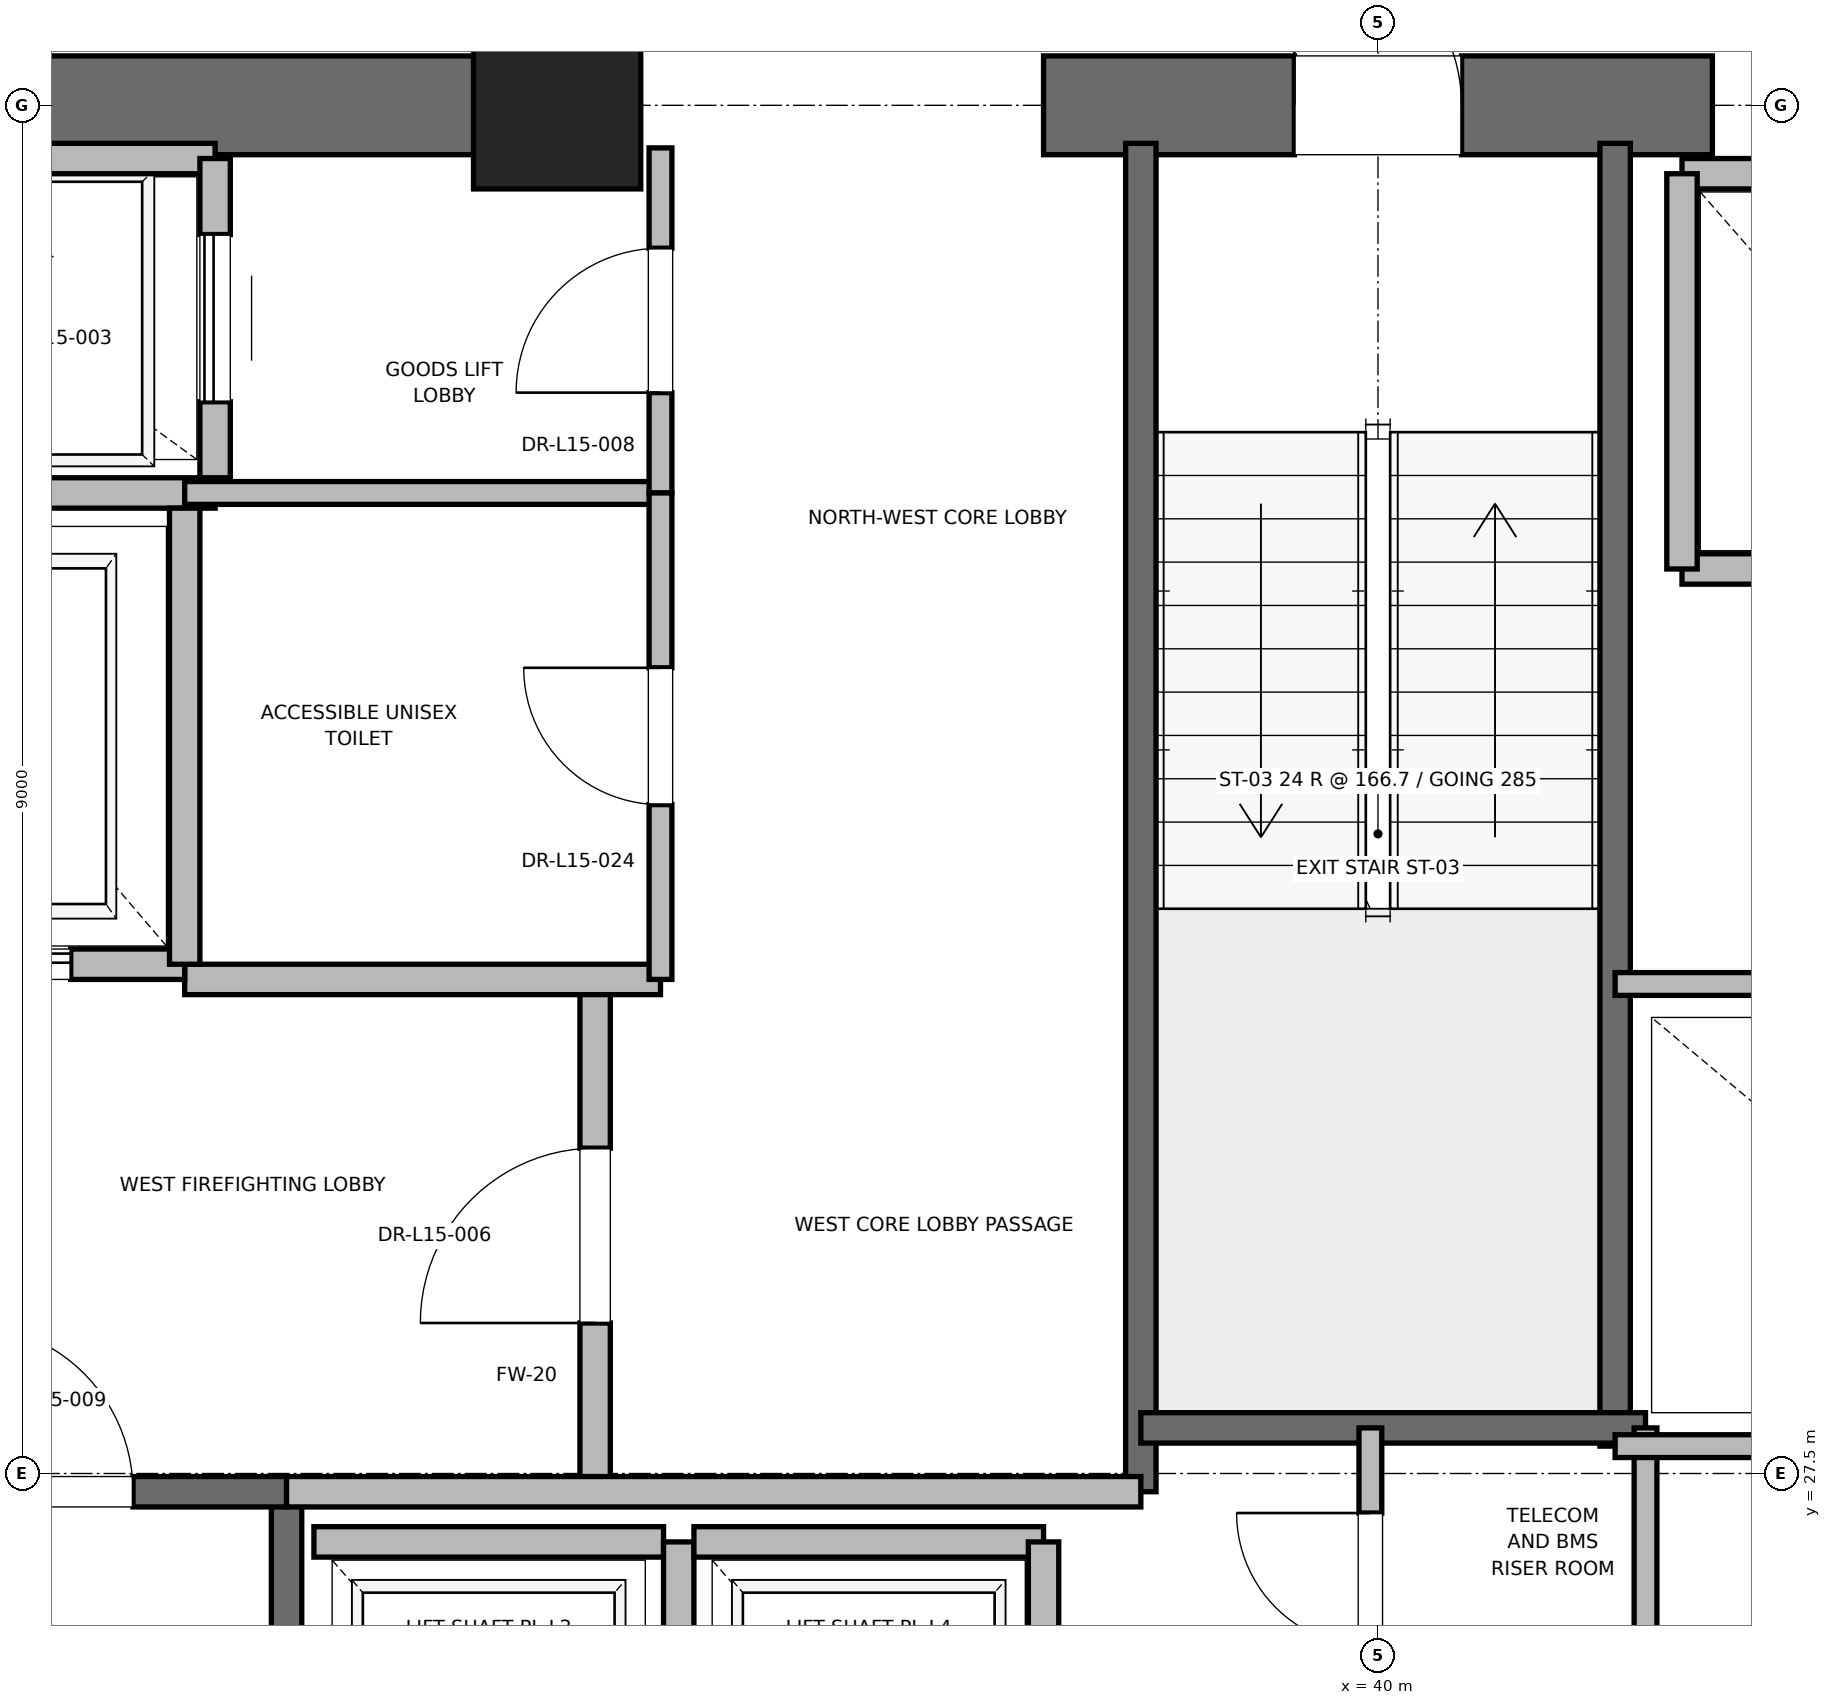
"""IFC4 building model, lengths in metres.
Left out: names, types, materials, properties, quantities, classifications, styles, units other than length and angle.
Written with IfcOpenShell. Run it as: python <this file> out.ifc"""

import sys

from ifc_helpers import new_model, si_unit, direction, frame, frame_2d, origin, origin_2d, place, context, subcontext, project, spatial, rectangle, extrude, element, fill, save


model = new_model("IFC4")
c1 = context("Model", 3, precision=1e-05, world=origin(), true_north=direction((0.0, 1.0)))
c2 = subcontext(c1, "Body", "Model", "MODEL_VIEW")
j1 = project(units=[si_unit("LENGTHUNIT", "METRE"), si_unit("PLANEANGLEUNIT", "RADIAN")], contexts=[c1])
p1 = place(None, origin())
s1 = spatial("IfcSite", under=j1, at=p1, CompositionType="ELEMENT")
p2 = place(p1, origin())
s2 = spatial("IfcBuilding", under=s1, at=p2, CompositionType="ELEMENT")
p3 = place(p2, frame((0.0, 0.0, 67.6)))
s3 = spatial("IfcBuildingStorey", under=s2, at=p3, CompositionType="ELEMENT", Elevation=67.6)
p4 = place(p3, frame((34.6, 36.5, 0.0), z_axis=(0.0, 0.0, 1.0), x_axis=(1.0, 0.0, 0.0)))
e1 = element("IfcColumn", 1, at=p4, inside=s3, PredefinedType="PILASTER", context=c2, shape_type="SweptSolid", body=[
    extrude(rectangle(XDim=1.1, YDim=1.1, at=origin_2d()), origin(), (0.0, 0.0, 1.0), 4.0),
])
p5 = place(p3, frame((29.0, 36.5, 0.0), z_axis=(0.0, 0.0, 1.0), x_axis=(1.0, 0.0, 0.0)))
e2 = element("IfcWall", 2, at=p5, inside=s3, PredefinedType="SHEAR", context=c2, shape_type="SweptSolid", body=[
    extrude(rectangle(XDim=5.8, YDim=0.65, at=frame_2d((2.9, 0.0))), origin(), (0.0, 0.0, 1.0), 3.76),
])
p6 = place(p3, frame((37.8, 36.5, 0.0), z_axis=(0.0, 0.0, 1.0), x_axis=(1.0, 0.0, 0.0)))
e3 = element("IfcWall", 3, at=p6, inside=s3, PredefinedType="SHEAR", context=c2, shape_type="SweptSolid", body=[
    extrude(rectangle(XDim=4.4, YDim=0.65, at=frame_2d((2.2, 0.0))), origin(), (0.0, 0.0, 1.0), 3.76),
])
p7 = place(p6, frame((1.65, 0.0, 0.0)))
e4 = element("IfcOpeningElement", 4, at=p7, cuts=e3, PredefinedType="OPENING", context=c2, shape_type="SweptSolid", body=[
    extrude(rectangle(XDim=1.1, YDim=2.15, at=frame_2d((0.55, 1.075))), frame((0.0, 0.325, 0.0), z_axis=(0.0, -1.0, 0.0), x_axis=(1.0, 0.0, 0.0)), (0.0, 0.0, 1.0), 0.65),
])
p8 = place(p3, frame((32.82, 18.6, 0.0), z_axis=(0.0, 0.0, 1.0), x_axis=(0.0, 1.0, 0.0)))
e5 = element("IfcWall", 5, at=p8, inside=s3, PredefinedType="SOLIDWALL", context=c2, shape_type="SweptSolid", body=[
    extrude(rectangle(XDim=8.78, YDim=0.2, at=frame_2d((4.39, 0.0))), origin(), (0.0, 0.0, 1.0), 3.76),
])
p9 = place(p3, frame((29.7, 27.38, 0.0), z_axis=(0.0, 0.0, 1.0), x_axis=(1.0, 0.0, 0.0)))
e6 = element("IfcWall", 6, at=p9, inside=s3, PredefinedType="SOLIDWALL", context=c2, shape_type="SweptSolid", body=[
    extrude(rectangle(XDim=3.12, YDim=0.2, at=frame_2d((1.56, 0.0))), origin(), (0.0, 0.0, 1.0), 3.76),
])
p10 = place(p9, frame((1.01, 0.0, 0.0)))
e7 = element("IfcOpeningElement", 7, at=p10, cuts=e6, PredefinedType="OPENING", context=c2, shape_type="SweptSolid", body=[
    extrude(rectangle(XDim=1.1, YDim=2.15, at=frame_2d((0.55, 1.075))), frame((0.0, 0.1, 0.0), z_axis=(0.0, -1.0, 0.0), x_axis=(1.0, 0.0, 0.0)), (0.0, 0.0, 1.0), 0.2),
])
p11 = place(p3, frame((38.44, 27.38, 0.0), z_axis=(0.0, 0.0, 1.0), x_axis=(0.0, 1.0, 0.0)))
e8 = element("IfcWall", 8, at=p11, inside=s3, PredefinedType="SOLIDWALL", context=c2, shape_type="SweptSolid", body=[
    extrude(rectangle(XDim=8.87, YDim=0.2, at=frame_2d((4.435, 0.0))), origin(), (0.0, 0.0, 1.0), 3.76),
])
p12 = place(p3, frame((41.56, 27.68, 0.0), z_axis=(0.0, 0.0, 1.0), x_axis=(0.0, 1.0, 0.0)))
e9 = element("IfcWall", 9, at=p12, inside=s3, PredefinedType="SOLIDWALL", context=c2, shape_type="SweptSolid", body=[
    extrude(rectangle(XDim=8.57, YDim=0.2, at=frame_2d((4.285, 0.0))), origin(), (0.0, 0.0, 1.0), 3.76),
])
p13 = place(p3, frame((38.44, 27.8, 0.0), z_axis=(0.0, 0.0, 1.0), x_axis=(1.0, 0.0, 0.0)))
e10 = element("IfcWall", 10, at=p13, inside=s3, PredefinedType="SOLIDWALL", context=c2, shape_type="SweptSolid", body=[
    extrude(rectangle(XDim=3.32, YDim=0.2, at=frame_2d((1.66, 0.0))), origin(), (0.0, 0.0, 1.0), 3.76),
])
p14 = place(p3, frame((34.85, 27.38, 0.0), z_axis=(0.0, 0.0, 1.0), x_axis=(0.0, 1.0, 0.0)))
e11 = element("IfcWall", 11, at=p14, inside=s3, PredefinedType="PARTITIONING", context=c2, shape_type="SweptSolid", body=[
    extrude(rectangle(XDim=3.37, YDim=0.2, at=frame_2d((1.685, 0.0))), origin(), (0.0, 0.0, 1.0), 3.76),
])
p15 = place(p14, frame((1.11, 0.0, 0.0)))
e12 = element("IfcOpeningElement", 12, at=p15, cuts=e11, PredefinedType="OPENING", context=c2, shape_type="SweptSolid", body=[
    extrude(rectangle(XDim=1.15, YDim=2.2, at=frame_2d((0.575, 1.1))), frame((0.0, 0.1, 0.0), z_axis=(0.0, -1.0, 0.0), x_axis=(1.0, 0.0, 0.0)), (0.0, 0.0, 1.0), 0.2),
])
p16 = place(p3, frame((32.82, 27.38, 0.0), z_axis=(0.0, 0.0, 1.0), x_axis=(1.0, 0.0, 0.0)))
e13 = element("IfcWall", 13, at=p16, inside=s3, PredefinedType="PARTITIONING", context=c2, shape_type="SweptSolid", body=[
    extrude(rectangle(XDim=5.62, YDim=0.2, at=frame_2d((2.81, 0.0))), origin(), (0.0, 0.0, 1.0), 3.76),
])
p17 = place(p3, frame((32.15, 30.75, 0.0), z_axis=(0.0, 0.0, 1.0), x_axis=(1.0, 0.0, 0.0)))
e14 = element("IfcWall", 14, at=p17, inside=s3, PredefinedType="PARTITIONING", context=c2, shape_type="SweptSolid", body=[
    extrude(rectangle(XDim=3.13, YDim=0.2, at=frame_2d((1.565, 0.0))), origin(), (0.0, 0.0, 1.0), 3.76),
])
p18 = place(p3, frame((29.55, 30.85, 0.0), z_axis=(0.0, 0.0, 1.0), x_axis=(1.0, 0.0, 0.0)))
e15 = element("IfcWall", 15, at=p18, inside=s3, PredefinedType="SOLIDWALL", context=c2, shape_type="SweptSolid", body=[
    extrude(rectangle(XDim=2.6, YDim=0.2, at=frame_2d((1.3, 0.0))), origin(), (0.0, 0.0, 1.0), 2.54),
])
p19 = place(p18, frame((0.75, 0.0, 0.0)))
e16 = element("IfcOpeningElement", 16, at=p19, cuts=e15, PredefinedType="OPENING", context=c2, shape_type="SweptSolid", body=[
    extrude(rectangle(XDim=1.1, YDim=2.2, at=frame_2d((0.55, 1.1))), frame((0.0, 0.1, 0.0), z_axis=(0.0, -1.0, 0.0), x_axis=(1.0, 0.0, 0.0)), (0.0, 0.0, 1.0), 0.2),
])
p20 = place(p3, frame((29.55, 33.95, 0.0), z_axis=(0.0, 0.0, 1.0), x_axis=(1.0, 0.0, 0.0)))
e17 = element("IfcWall", 17, at=p20, inside=s3, PredefinedType="SOLIDWALL", context=c2, shape_type="SweptSolid", body=[
    extrude(rectangle(XDim=2.8, YDim=0.2, at=frame_2d((1.4, 0.0))), origin(), (0.0, 0.0, 1.0), 3.76),
])
p21 = place(p3, frame((32.15, 30.85, 0.0), z_axis=(0.0, 0.0, 1.0), x_axis=(0.0, 1.0, 0.0)))
e18 = element("IfcWall", 18, at=p21, inside=s3, PredefinedType="SOLIDWALL", context=c2, shape_type="SweptSolid", body=[
    extrude(rectangle(XDim=3.0, YDim=0.2, at=frame_2d((1.5, 0.0))), origin(), (0.0, 0.0, 1.0), 3.76),
])
p22 = place(p3, frame((32.35, 36.15, 0.0), z_axis=(0.0, 0.0, 1.0), x_axis=(-1.0, 0.0, 0.0)))
e19 = element("IfcWall", 19, at=p22, inside=s3, PredefinedType="SOLIDWALL", context=c2, shape_type="SweptSolid", body=[
    extrude(rectangle(XDim=2.8, YDim=0.2, at=frame_2d((1.4, 0.0))), origin(), (0.0, 0.0, 1.0), 2.889),
])
p23 = place(p3, frame((32.35, 34.05, 0.0), z_axis=(0.0, 0.0, 1.0), x_axis=(0.0, 1.0, 0.0)))
e20 = element("IfcWall", 20, at=p23, inside=s3, PredefinedType="SOLIDWALL", context=c2, shape_type="SweptSolid", body=[
    extrude(rectangle(XDim=2.1, YDim=0.2, at=frame_2d((1.05, 0.0))), origin(), (0.0, 0.0, 1.0), 3.76),
])
p24 = place(p23, frame((0.5, 0.0, 0.0)))
e21 = element("IfcOpeningElement", 21, at=p24, cuts=e20, PredefinedType="OPENING", context=c2, shape_type="SweptSolid", body=[
    extrude(rectangle(XDim=1.1, YDim=2.2, at=frame_2d((0.55, 1.1))), frame((0.0, 0.1, 0.0), z_axis=(0.0, -1.0, 0.0), x_axis=(1.0, 0.0, 0.0)), (0.0, 0.0, 1.0), 0.2),
])
p25 = place(p3, frame((35.3, 27.05, 0.0), z_axis=(0.0, 0.0, 1.0), x_axis=(-1.0, 0.0, 0.0)))
e22 = element("IfcWall", 22, at=p25, inside=s3, PredefinedType="SOLIDWALL", context=c2, shape_type="SweptSolid", body=[
    extrude(rectangle(XDim=2.3, YDim=0.2, at=frame_2d((1.15, 0.0))), origin(), (0.0, 0.0, 1.0), 3.76),
])
p26 = place(p3, frame((35.4, 24.45, 0.0), z_axis=(0.0, 0.0, 1.0), x_axis=(0.0, 1.0, 0.0)))
e23 = element("IfcWall", 23, at=p26, inside=s3, PredefinedType="SOLIDWALL", context=c2, shape_type="SweptSolid", body=[
    extrude(rectangle(XDim=2.6, YDim=0.2, at=frame_2d((1.3, 0.0))), origin(), (0.0, 0.0, 1.0), 3.76),
])
p27 = place(p3, frame((37.8, 27.05, 0.0), z_axis=(0.0, 0.0, 1.0), x_axis=(-1.0, 0.0, 0.0)))
e24 = element("IfcWall", 24, at=p27, inside=s3, PredefinedType="SOLIDWALL", context=c2, shape_type="SweptSolid", body=[
    extrude(rectangle(XDim=2.3, YDim=0.2, at=frame_2d((1.15, 0.0))), origin(), (0.0, 0.0, 1.0), 3.76),
])
p28 = place(p3, frame((37.8, 24.45, 0.0), z_axis=(0.0, 0.0, 1.0), x_axis=(0.0, 1.0, 0.0)))
e25 = element("IfcWall", 25, at=p28, inside=s3, PredefinedType="SOLIDWALL", context=c2, shape_type="SweptSolid", body=[
    extrude(rectangle(XDim=2.6, YDim=0.2, at=frame_2d((1.3, 0.0))), origin(), (0.0, 0.0, 1.0), 3.76),
])
p29 = place(p3, frame((42.0, 33.45, 0.0), z_axis=(0.0, 0.0, 1.0), x_axis=(1.0, 0.0, 0.0)))
e26 = element("IfcWall", 26, at=p29, inside=s3, PredefinedType="SOLIDWALL", context=c2, shape_type="SweptSolid", body=[
    extrude(rectangle(XDim=2.3, YDim=0.2, at=frame_2d((1.15, 0.0))), origin(), (0.0, 0.0, 1.0), 3.76),
])
p30 = place(p3, frame((44.3, 36.05, 0.0), z_axis=(0.0, 0.0, 1.0), x_axis=(-1.0, 0.0, 0.0)))
e27 = element("IfcWall", 27, at=p30, inside=s3, PredefinedType="SOLIDWALL", context=c2, shape_type="SweptSolid", body=[
    extrude(rectangle(XDim=2.3, YDim=0.2, at=frame_2d((1.15, 0.0))), origin(), (0.0, 0.0, 1.0), 2.54),
])
p31 = place(p3, frame((42.0, 36.05, 0.0), z_axis=(0.0, 0.0, 1.0), x_axis=(0.0, -1.0, 0.0)))
e28 = element("IfcWall", 28, at=p31, inside=s3, PredefinedType="SOLIDWALL", context=c2, shape_type="SweptSolid", body=[
    extrude(rectangle(XDim=2.6, YDim=0.2, at=frame_2d((1.3, 0.0))), origin(), (0.0, 0.0, 1.0), 2.54),
])
p32 = place(p3, frame((41.76, 23.8, 0.0), z_axis=(0.0, 0.0, 1.0), x_axis=(0.0, 1.0, 0.0)))
e29 = element("IfcWall", 29, at=p32, inside=s3, PredefinedType="PARTITIONING", context=c2, shape_type="SweptSolid", body=[
    extrude(rectangle(XDim=4.0, YDim=0.15, at=frame_2d((2.0, 0.0))), origin(), (0.0, 0.0, 1.0), 2.85),
])
p33 = place(p3, frame((39.95, 25.8, 0.0), z_axis=(0.0, 0.0, 1.0), x_axis=(0.0, 1.0, 0.0)))
e30 = element("IfcWall", 30, at=p33, inside=s3, PredefinedType="PARTITIONING", context=c2, shape_type="SweptSolid", body=[
    extrude(rectangle(XDim=2.0, YDim=0.15, at=frame_2d((1.0, 0.0))), origin(), (0.0, 0.0, 1.0), 2.85),
])
p34 = place(p33, frame((0.56, 0.0, 0.0)))
e31 = element("IfcOpeningElement", 31, at=p34, cuts=e30, PredefinedType="OPENING", context=c2, shape_type="SweptSolid", body=[
    extrude(rectangle(XDim=0.88, YDim=2.1, at=frame_2d((0.44, 1.05))), frame((0.0, 0.075, 0.0), z_axis=(0.0, -1.0, 0.0), x_axis=(1.0, 0.0, 0.0)), (0.0, 0.0, 1.0), 0.15),
])
p35 = place(p3, frame((32.15, 33.95, 0.0), z_axis=(0.0, 0.0, 1.0), x_axis=(1.0, 0.0, 0.0)))
e32 = element("IfcWall", 32, at=p35, inside=s3, PredefinedType="PARTITIONING", context=c2, shape_type="SweptSolid", body=[
    extrude(rectangle(XDim=3.13, YDim=0.15, at=frame_2d((1.565, 0.0))), origin(), (0.0, 0.0, 1.0), 2.85),
])
p36 = place(p3, frame((35.28, 33.95, 0.0), z_axis=(0.0, 0.0, 1.0), x_axis=(0.0, 1.0, 0.0)))
e33 = element("IfcWall", 33, at=p36, inside=s3, PredefinedType="PARTITIONING", context=c2, shape_type="SweptSolid", body=[
    extrude(rectangle(XDim=2.27, YDim=0.15, at=frame_2d((1.135, 0.0))), origin(), (0.0, 0.0, 1.0), 2.54),
])
p37 = place(p36, frame((0.66, 0.0, 0.0)))
e34 = element("IfcOpeningElement", 34, at=p37, cuts=e33, PredefinedType="OPENING", context=c2, shape_type="SweptSolid", body=[
    extrude(rectangle(XDim=0.95, YDim=2.15, at=frame_2d((0.475, 1.075))), frame((0.0, 0.075, 0.0), z_axis=(0.0, -1.0, 0.0), x_axis=(1.0, 0.0, 0.0)), (0.0, 0.0, 1.0), 0.15),
])
p38 = place(p3, frame((35.28, 30.75, 0.0), z_axis=(0.0, 0.0, 1.0), x_axis=(0.0, 1.0, 0.0)))
e35 = element("IfcWall", 35, at=p38, inside=s3, PredefinedType="PARTITIONING", context=c2, shape_type="SweptSolid", body=[
    extrude(rectangle(XDim=3.2, YDim=0.15, at=frame_2d((1.6, 0.0))), origin(), (0.0, 0.0, 1.0), 2.85),
])
p39 = place(p38, frame((1.15, 0.0, 0.0)))
e36 = element("IfcOpeningElement", 36, at=p39, cuts=e35, PredefinedType="OPENING", context=c2, shape_type="SweptSolid", body=[
    extrude(rectangle(XDim=0.9, YDim=2.1, at=frame_2d((0.45, 1.05))), frame((0.0, 0.075, 0.0), z_axis=(0.0, -1.0, 0.0), x_axis=(1.0, 0.0, 0.0)), (0.0, 0.0, 1.0), 0.15),
])
p40 = place(p3, frame((41.56, 27.68, 0.0), z_axis=(0.0, 0.0, 1.0), x_axis=(1.0, 0.0, 0.0)))
e37 = element("IfcWall", 37, at=p40, inside=s3, PredefinedType="PARTITIONING", context=c2, shape_type="SweptSolid", body=[
    extrude(rectangle(XDim=3.59, YDim=0.15, at=frame_2d((1.795, 0.0))), origin(), (0.0, 0.0, 1.0), 2.85),
])
p41 = place(p3, frame((41.56, 30.72, 0.0), z_axis=(0.0, 0.0, 1.0), x_axis=(1.0, 0.0, 0.0)))
e38 = element("IfcWall", 38, at=p41, inside=s3, PredefinedType="PARTITIONING", context=c2, shape_type="SweptSolid", body=[
    extrude(rectangle(XDim=3.59, YDim=0.15, at=frame_2d((1.795, 0.0))), origin(), (0.0, 0.0, 1.0), 2.85),
])
p42 = place(p41, frame((1.355, 0.0, 0.0)))
e39 = element("IfcOpeningElement", 39, at=p42, cuts=e38, PredefinedType="OPENING", context=c2, shape_type="SweptSolid", body=[
    extrude(rectangle(XDim=0.88, YDim=2.1, at=frame_2d((0.44, 1.05))), frame((0.0, 0.075, 0.0), z_axis=(0.0, -1.0, 0.0), x_axis=(1.0, 0.0, 0.0)), (0.0, 0.0, 1.0), 0.15),
])
p43 = place(p10, origin())
e40 = element("IfcDoor", 40, at=p43, inside=s3, OperationType="SINGLE_SWING_LEFT", PredefinedType="DOOR", context=c2, shape_type="SweptSolid", body=[
    extrude(rectangle(XDim=1.1, YDim=2.15, at=frame_2d((0.55, 1.075))), frame((0.0, 0.025, 0.0), z_axis=(0.0, -1.0, 0.0), x_axis=(1.0, 0.0, 0.0)), (0.0, 0.0, 1.0), 0.05),
])
fill(e7, e40)
p44 = place(p7, origin())
e41 = element("IfcDoor", 41, at=p44, inside=s3, OperationType="SINGLE_SWING_LEFT", PredefinedType="DOOR", context=c2, shape_type="SweptSolid", body=[
    extrude(rectangle(XDim=1.1, YDim=2.15, at=frame_2d((0.55, 1.075))), frame((0.0, 0.025, 0.0), z_axis=(0.0, -1.0, 0.0), x_axis=(1.0, 0.0, 0.0)), (0.0, 0.0, 1.0), 0.05),
])
fill(e4, e41)
p45 = place(p15, origin())
e42 = element("IfcDoor", 42, at=p45, inside=s3, OperationType="SINGLE_SWING_LEFT", PredefinedType="DOOR", context=c2, shape_type="SweptSolid", body=[
    extrude(rectangle(XDim=1.15, YDim=2.2, at=frame_2d((0.575, 1.1))), frame((0.0, 0.025, 0.0), z_axis=(0.0, -1.0, 0.0), x_axis=(1.0, 0.0, 0.0)), (0.0, 0.0, 1.0), 0.05),
])
fill(e12, e42)
p46 = place(p19, origin())
e43 = element("IfcDoor", 43, at=p46, inside=s3, OperationType="SLIDING_TO_RIGHT", PredefinedType="DOOR", context=c2, shape_type="SweptSolid", body=[
    extrude(rectangle(XDim=1.1, YDim=2.2, at=frame_2d((0.55, 1.1))), frame((0.0, 0.025, 0.0), z_axis=(0.0, -1.0, 0.0), x_axis=(1.0, 0.0, 0.0)), (0.0, 0.0, 1.0), 0.05),
])
fill(e16, e43)
p47 = place(p24, origin())
e44 = element("IfcDoor", 44, at=p47, inside=s3, OperationType="SLIDING_TO_RIGHT", PredefinedType="DOOR", context=c2, shape_type="SweptSolid", body=[
    extrude(rectangle(XDim=1.1, YDim=2.2, at=frame_2d((0.55, 1.1))), frame((0.0, 0.025, 0.0), z_axis=(0.0, -1.0, 0.0), x_axis=(1.0, 0.0, 0.0)), (0.0, 0.0, 1.0), 0.05),
])
fill(e21, e44)
p48 = place(p34, origin())
e45 = element("IfcDoor", 45, at=p48, inside=s3, OperationType="SINGLE_SWING_RIGHT", PredefinedType="DOOR", context=c2, shape_type="SweptSolid", body=[
    extrude(rectangle(XDim=0.88, YDim=2.1, at=frame_2d((0.44, 1.05))), frame((0.0, 0.025, 0.0), z_axis=(0.0, -1.0, 0.0), x_axis=(1.0, 0.0, 0.0)), (0.0, 0.0, 1.0), 0.05),
])
fill(e31, e45)
p49 = place(p37, origin())
e46 = element("IfcDoor", 46, at=p49, inside=s3, OperationType="SINGLE_SWING_LEFT", PredefinedType="DOOR", context=c2, shape_type="SweptSolid", body=[
    extrude(rectangle(XDim=0.95, YDim=2.15, at=frame_2d((0.475, 1.075))), frame((0.0, 0.025, 0.0), z_axis=(0.0, -1.0, 0.0), x_axis=(1.0, 0.0, 0.0)), (0.0, 0.0, 1.0), 0.05),
])
fill(e34, e46)
p50 = place(p39, origin())
e47 = element("IfcDoor", 47, at=p50, inside=s3, OperationType="SINGLE_SWING_RIGHT", PredefinedType="DOOR", context=c2, shape_type="SweptSolid", body=[
    extrude(rectangle(XDim=0.9, YDim=2.1, at=frame_2d((0.45, 1.05))), frame((0.0, 0.025, 0.0), z_axis=(0.0, -1.0, 0.0), x_axis=(1.0, 0.0, 0.0)), (0.0, 0.0, 1.0), 0.05),
])
fill(e36, e47)
save(model, sys.argv[1])
